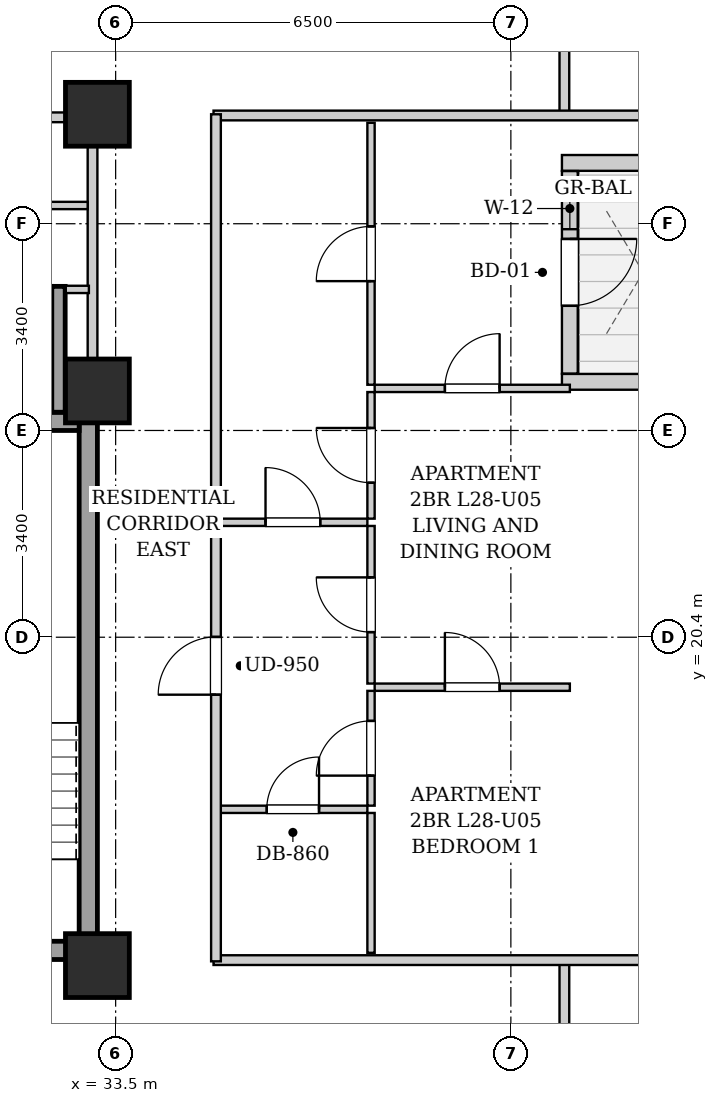
"""IFC4 building model, lengths in metres.
Left out: names, types, materials, properties, quantities, classifications, styles, units other than length and angle.
Written with IfcOpenShell. Run it as: python <this file> out.ifc"""

import sys

from ifc_helpers import new_model, si_unit, direction, frame, frame_2d, origin, origin_2d, place, context, subcontext, project, spatial, rectangle, extrude, element, fill, save


model = new_model("IFC4")
c1 = context("Model", 3, precision=1e-05, world=origin(), true_north=direction((0.0, 1.0)))
c2 = subcontext(c1, "Body", "Model", "MODEL_VIEW")
j1 = project(units=[si_unit("LENGTHUNIT", "METRE"), si_unit("PLANEANGLEUNIT", "RADIAN")], contexts=[c1])
p1 = place(None, origin())
s1 = spatial("IfcSite", under=j1, at=p1, CompositionType="ELEMENT")
p2 = place(p1, origin())
s2 = spatial("IfcBuilding", under=s1, at=p2, CompositionType="ELEMENT")
p3 = place(p2, frame((0.0, 0.0, 100.7)))
s3 = spatial("IfcBuildingStorey", under=s2, at=p3, CompositionType="ELEMENT", Elevation=100.7)
for number, where, z_axis, x_axis in (
    (1, (33.2, 15.0, 0.0), (0.0, 0.0, 1.0), (1.0, 0.0, 0.0)),
    (2, (33.2, 29.0, 0.0), (0.0, 0.0, 1.0), (1.0, 0.0, 0.0)),
    (3, (33.2, 24.45, 0.0), (0.0, 0.0, 1.0), (1.0, 0.0, 0.0)),
):
    element("IfcColumn", number, at=place(p3, frame(where, z_axis=z_axis, x_axis=x_axis)), inside=s3, PredefinedType="COLUMN", context=c2, shape_type="SweptSolid", body=[
        extrude(rectangle(XDim=1.05, YDim=1.05, at=origin_2d()), origin(), (0.0, 0.0, 1.0), 3.2),
    ])
p4 = place(p3, frame((43.24, 28.2, 0.0), z_axis=(0.0, 0.0, 1.0), x_axis=(-1.0, 0.0, 0.0)))
e4 = element("IfcWall", 4, at=p4, inside=s3, PredefinedType="SOLIDWALL", context=c2, shape_type="SweptSolid", body=[
    extrude(rectangle(XDim=2.4, YDim=0.26, at=frame_2d((1.2, 0.0))), origin(), (0.0, 0.0, 1.0), 2.94),
])
p5 = place(p3, frame((40.97, 28.066, 0.0), z_axis=(0.0, 0.0, 1.0), x_axis=(0.0, -1.0, 0.0)))
e5 = element("IfcWall", 5, at=p5, inside=s3, PredefinedType="SOLIDWALL", context=c2, shape_type="SweptSolid", body=[
    extrude(rectangle(XDim=3.332, YDim=0.26, at=frame_2d((1.666, 0.0))), origin(), (0.0, 0.0, 1.0), 2.94),
])
p6 = place(p5, frame((1.116, 0.0, 0.0)))
e6 = element("IfcOpeningElement", 6, at=p6, cuts=e5, PredefinedType="OPENING", context=c2, shape_type="SweptSolid", body=[
    extrude(rectangle(XDim=1.1, YDim=2.0, at=frame_2d((0.55, 1.0))), frame((0.0, 0.14, 0.0), z_axis=(0.0, -1.0, 0.0), x_axis=(1.0, 0.0, 0.0)), (0.0, 0.0, 1.0), 0.28),
])
p7 = place(p5, frame((0.276, 0.0, 0.55)))
e7 = element("IfcOpeningElement", 7, at=p7, cuts=e5, PredefinedType="OPENING", context=c2, shape_type="SweptSolid", body=[
    extrude(rectangle(XDim=0.68, YDim=1.2, at=frame_2d((0.34, 0.6))), frame((0.0, 0.14, 0.0), z_axis=(0.0, -1.0, 0.0), x_axis=(1.0, 0.0, 0.0)), (0.0, 0.0, 1.0), 0.28),
])
p8 = place(p3, frame((40.84, 24.6, 0.0), z_axis=(0.0, 0.0, 1.0), x_axis=(1.0, 0.0, 0.0)))
e8 = element("IfcWall", 8, at=p8, inside=s3, PredefinedType="SOLIDWALL", context=c2, shape_type="SweptSolid", body=[
    extrude(rectangle(XDim=2.4, YDim=0.26, at=frame_2d((1.2, 0.0))), origin(), (0.0, 0.0, 1.0), 2.94),
])
p9 = place(p3, frame((33.05, 15.1, 0.0), z_axis=(0.0, 0.0, 1.0), x_axis=(0.0, 1.0, 0.0)))
e9 = element("IfcWall", 9, at=p9, inside=s3, PredefinedType="SHEAR", context=c2, shape_type="SweptSolid", body=[
    extrude(rectangle(XDim=9.0, YDim=0.3, at=frame_2d((4.5, 0.0))), origin(), (0.0, 0.0, 1.0), 2.94),
])
p10 = place(p3, frame((30.05, 23.95, 0.0), z_axis=(0.0, 0.0, 1.0), x_axis=(1.0, 0.0, 0.0)))
e10 = element("IfcWall", 10, at=p10, inside=s3, PredefinedType="SHEAR", context=c2, shape_type="SweptSolid", body=[
    extrude(rectangle(XDim=2.85, YDim=0.3, at=frame_2d((1.425, 0.0))), origin(), (0.0, 0.0, 1.0), 2.94),
])
p11 = place(p3, frame((30.05, 15.25, 0.0), z_axis=(0.0, 0.0, 1.0), x_axis=(1.0, 0.0, 0.0)))
e11 = element("IfcWall", 11, at=p11, inside=s3, PredefinedType="SHEAR", context=c2, shape_type="SweptSolid", body=[
    extrude(rectangle(XDim=2.85, YDim=0.3, at=frame_2d((1.425, 0.0))), origin(), (0.0, 0.0, 1.0), 2.94),
])
p12 = place(p11, frame((0.86, 0.0, 0.0)))
e12 = element("IfcOpeningElement", 12, at=p12, cuts=e11, PredefinedType="OPENING", context=c2, shape_type="SweptSolid", body=[
    extrude(rectangle(XDim=1.1, YDim=2.05, at=frame_2d((0.55, 1.025))), frame((0.0, 0.16, 0.0), z_axis=(0.0, -1.0, 0.0), x_axis=(1.0, 0.0, 0.0)), (0.0, 0.0, 1.0), 0.32),
])
p13 = place(p3, frame((32.56, 24.1, 0.0), z_axis=(0.0, 0.0, 1.0), x_axis=(0.0, 1.0, 0.0)))
e13 = element("IfcWall", 13, at=p13, inside=s3, PredefinedType="SHEAR", context=c2, shape_type="SweptSolid", body=[
    extrude(rectangle(XDim=2.07, YDim=0.22, at=frame_2d((1.035, 0.0))), origin(), (0.0, 0.0, 1.0), 2.94),
])
p14 = place(p3, frame((33.12, 24.12, 0.0), z_axis=(0.0, 0.0, 1.0), x_axis=(0.0, 1.0, 0.0)))
e14 = element("IfcWall", 14, at=p14, inside=s3, PredefinedType="PARTITIONING", context=c2, shape_type="SweptSolid", body=[
    extrude(rectangle(XDim=4.76, YDim=0.16, at=frame_2d((2.38, 0.0))), origin(), (0.0, 0.0, 1.0), 2.94),
])
p15 = place(p3, frame((32.68, 26.12, 0.0), z_axis=(0.0, 0.0, 1.0), x_axis=(1.0, 0.0, 0.0)))
e15 = element("IfcWall", 15, at=p15, inside=s3, PredefinedType="PARTITIONING", context=c2, shape_type="SweptSolid", body=[
    extrude(rectangle(XDim=0.38, YDim=0.12, at=frame_2d((0.19, 0.0))), origin(), (0.0, 0.0, 1.0), 2.94),
])
p16 = place(p3, frame((30.16, 27.5, 0.0), z_axis=(0.0, 0.0, 1.0), x_axis=(1.0, 0.0, 0.0)))
e16 = element("IfcWall", 16, at=p16, inside=s3, PredefinedType="PARTITIONING", context=c2, shape_type="SweptSolid", body=[
    extrude(rectangle(XDim=2.88, YDim=0.12, at=frame_2d((1.44, 0.0))), origin(), (0.0, 0.0, 1.0), 2.94),
])
p17 = place(p16, frame((0.97, 0.0, 0.0)))
e17 = element("IfcOpeningElement", 17, at=p17, cuts=e16, PredefinedType="OPENING", context=c2, shape_type="SweptSolid", body=[
    extrude(rectangle(XDim=0.86, YDim=2.05, at=frame_2d((0.43, 1.025))), frame((0.0, 0.07, 0.0), z_axis=(0.0, -1.0, 0.0), x_axis=(1.0, 0.0, 0.0)), (0.0, 0.0, 1.0), 0.14),
])
p18 = place(p3, frame((30.08, 28.95, 0.0), z_axis=(0.0, 0.0, 1.0), x_axis=(1.0, 0.0, 0.0)))
e18 = element("IfcWall", 18, at=p18, inside=s3, PredefinedType="PARTITIONING", context=c2, shape_type="SweptSolid", body=[
    extrude(rectangle(XDim=2.96, YDim=0.16, at=frame_2d((1.48, 0.0))), origin(), (0.0, 0.0, 1.0), 2.94),
])
p19 = place(p18, frame((1.045, 0.0, 0.0)))
e19 = element("IfcOpeningElement", 19, at=p19, cuts=e18, PredefinedType="OPENING", context=c2, shape_type="SweptSolid", body=[
    extrude(rectangle(XDim=0.86, YDim=2.05, at=frame_2d((0.43, 1.025))), frame((0.0, 0.09, 0.0), z_axis=(0.0, -1.0, 0.0), x_axis=(1.0, 0.0, 0.0)), (0.0, 0.0, 1.0), 0.18),
])
for number, where, z_axis, x_axis in (
    (20, (40.88, 13.35, 0.0), (0.0, 0.0, 1.0), (0.0, 1.0, 0.0)),
    (21, (40.88, 28.98, 0.0), (0.0, 0.0, 1.0), (0.0, 1.0, 0.0)),
):
    element("IfcWall", number, at=place(p3, frame(where, z_axis=z_axis, x_axis=x_axis)), inside=s3, PredefinedType="PARTITIONING", context=c2, shape_type="SweptSolid", body=[
        extrude(rectangle(XDim=1.74, YDim=0.16, at=frame_2d((0.87, 0.0))), origin(), (0.0, 0.0, 1.0), 2.94),
    ])
for number, where, z_axis, x_axis in (
    (22, (35.11, 15.09, 0.0), (0.0, 0.0, 1.0), (1.0, 0.0, 0.0)),
    (23, (35.11, 28.98, 0.0), (0.0, 0.0, 1.0), (1.0, 0.0, 0.0)),
):
    element("IfcWall", number, at=place(p3, frame(where, z_axis=z_axis, x_axis=x_axis)), inside=s3, PredefinedType="PARTITIONING", context=c2, shape_type="SweptSolid", body=[
        extrude(rectangle(XDim=8.01, YDim=0.16, at=frame_2d((4.005, 0.0))), origin(), (0.0, 0.0, 1.0), 2.313),
    ])
p20 = place(p3, frame((35.19, 22.29, 0.0), z_axis=(0.0, 0.0, 1.0), x_axis=(1.0, 0.0, 0.0)))
e24 = element("IfcWall", 24, at=p20, inside=s3, PredefinedType="PARTITIONING", context=c2, shape_type="SweptSolid", body=[
    extrude(rectangle(XDim=2.45, YDim=0.12, at=frame_2d((1.225, 0.0))), origin(), (0.0, 0.0, 1.0), 2.94),
])
p21 = place(p20, frame((0.775, 0.0, 0.0)))
e25 = element("IfcOpeningElement", 25, at=p21, cuts=e24, PredefinedType="OPENING", context=c2, shape_type="SweptSolid", body=[
    extrude(rectangle(XDim=0.9, YDim=2.05, at=frame_2d((0.45, 1.025))), frame((0.0, 0.07, 0.0), z_axis=(0.0, -1.0, 0.0), x_axis=(1.0, 0.0, 0.0)), (0.0, 0.0, 1.0), 0.14),
])
p22 = place(p3, frame((37.7, 22.35, 0.0), z_axis=(0.0, 0.0, 1.0), x_axis=(0.0, 1.0, 0.0)))
e26 = element("IfcWall", 26, at=p22, inside=s3, PredefinedType="PARTITIONING", context=c2, shape_type="SweptSolid", body=[
    extrude(rectangle(XDim=2.082, YDim=0.12, at=frame_2d((1.041, 0.0))), origin(), (0.0, 0.0, 1.0), 2.94),
])
p23 = place(p22, frame((0.591, 0.0, 0.0)))
e27 = element("IfcOpeningElement", 27, at=p23, cuts=e26, PredefinedType="OPENING", context=c2, shape_type="SweptSolid", body=[
    extrude(rectangle(XDim=0.9, YDim=2.05, at=frame_2d((0.45, 1.025))), frame((0.0, 0.07, 0.0), z_axis=(0.0, -1.0, 0.0), x_axis=(1.0, 0.0, 0.0)), (0.0, 0.0, 1.0), 0.14),
])
p24 = place(p3, frame((37.7, 24.552, 0.0), z_axis=(0.0, 0.0, 1.0), x_axis=(0.0, 1.0, 0.0)))
e28 = element("IfcWall", 28, at=p24, inside=s3, PredefinedType="PARTITIONING", context=c2, shape_type="SweptSolid", body=[
    extrude(rectangle(XDim=4.308, YDim=0.12, at=frame_2d((2.154, 0.0))), origin(), (0.0, 0.0, 1.0), 2.94),
])
p25 = place(p24, frame((1.704, 0.0, 0.0)))
e29 = element("IfcOpeningElement", 29, at=p25, cuts=e28, PredefinedType="OPENING", context=c2, shape_type="SweptSolid", body=[
    extrude(rectangle(XDim=0.9, YDim=2.05, at=frame_2d((0.45, 1.025))), frame((0.0, 0.07, 0.0), z_axis=(0.0, -1.0, 0.0), x_axis=(1.0, 0.0, 0.0)), (0.0, 0.0, 1.0), 0.14),
])
p26 = place(p3, frame((35.19, 17.57, 0.0), z_axis=(0.0, 0.0, 1.0), x_axis=(1.0, 0.0, 0.0)))
e30 = element("IfcWall", 30, at=p26, inside=s3, PredefinedType="PARTITIONING", context=c2, shape_type="SweptSolid", body=[
    extrude(rectangle(XDim=2.45, YDim=0.12, at=frame_2d((1.225, 0.0))), origin(), (0.0, 0.0, 1.0), 2.94),
])
p27 = place(p26, frame((0.795, 0.0, 0.0)))
e31 = element("IfcOpeningElement", 31, at=p27, cuts=e30, PredefinedType="OPENING", context=c2, shape_type="SweptSolid", body=[
    extrude(rectangle(XDim=0.86, YDim=2.05, at=frame_2d((0.43, 1.025))), frame((0.0, 0.07, 0.0), z_axis=(0.0, -1.0, 0.0), x_axis=(1.0, 0.0, 0.0)), (0.0, 0.0, 1.0), 0.14),
])
p28 = place(p3, frame((37.7, 15.21, 0.0), z_axis=(0.0, 0.0, 1.0), x_axis=(0.0, 1.0, 0.0)))
e32 = element("IfcWall", 32, at=p28, inside=s3, PredefinedType="PARTITIONING", context=c2, shape_type="SweptSolid", body=[
    extrude(rectangle(XDim=2.3, YDim=0.12, at=frame_2d((1.15, 0.0))), origin(), (0.0, 0.0, 1.0), 2.94),
])
p29 = place(p3, frame((37.7, 17.63, 0.0), z_axis=(0.0, 0.0, 1.0), x_axis=(0.0, 1.0, 0.0)))
e33 = element("IfcWall", 33, at=p29, inside=s3, PredefinedType="PARTITIONING", context=c2, shape_type="SweptSolid", body=[
    extrude(rectangle(XDim=1.888, YDim=0.12, at=frame_2d((0.944, 0.0))), origin(), (0.0, 0.0, 1.0), 2.94),
])
p30 = place(p29, frame((0.494, 0.0, 0.0)))
e34 = element("IfcOpeningElement", 34, at=p30, cuts=e33, PredefinedType="OPENING", context=c2, shape_type="SweptSolid", body=[
    extrude(rectangle(XDim=0.9, YDim=2.05, at=frame_2d((0.45, 1.025))), frame((0.0, 0.07, 0.0), z_axis=(0.0, -1.0, 0.0), x_axis=(1.0, 0.0, 0.0)), (0.0, 0.0, 1.0), 0.14),
])
p31 = place(p3, frame((37.7, 19.638, 0.0), z_axis=(0.0, 0.0, 1.0), x_axis=(0.0, 1.0, 0.0)))
e35 = element("IfcWall", 35, at=p31, inside=s3, PredefinedType="PARTITIONING", context=c2, shape_type="SweptSolid", body=[
    extrude(rectangle(XDim=2.592, YDim=0.12, at=frame_2d((1.296, 0.0))), origin(), (0.0, 0.0, 1.0), 2.94),
])
p32 = place(p31, frame((0.846, 0.0, 0.0)))
e36 = element("IfcOpeningElement", 36, at=p32, cuts=e35, PredefinedType="OPENING", context=c2, shape_type="SweptSolid", body=[
    extrude(rectangle(XDim=0.9, YDim=2.05, at=frame_2d((0.45, 1.025))), frame((0.0, 0.07, 0.0), z_axis=(0.0, -1.0, 0.0), x_axis=(1.0, 0.0, 0.0)), (0.0, 0.0, 1.0), 0.14),
])
p33 = place(p3, frame((37.76, 19.578, 0.0), z_axis=(0.0, 0.0, 1.0), x_axis=(1.0, 0.0, 0.0)))
e37 = element("IfcWall", 37, at=p33, inside=s3, PredefinedType="PARTITIONING", context=c2, shape_type="SweptSolid", body=[
    extrude(rectangle(XDim=3.21, YDim=0.12, at=frame_2d((1.605, 0.0))), origin(), (0.0, 0.0, 1.0), 2.94),
])
p34 = place(p33, frame((1.155, 0.0, 0.0)))
e38 = element("IfcOpeningElement", 38, at=p34, cuts=e37, PredefinedType="OPENING", context=c2, shape_type="SweptSolid", body=[
    extrude(rectangle(XDim=0.9, YDim=2.05, at=frame_2d((0.45, 1.025))), frame((0.0, 0.07, 0.0), z_axis=(0.0, -1.0, 0.0), x_axis=(1.0, 0.0, 0.0)), (0.0, 0.0, 1.0), 0.14),
])
p35 = place(p3, frame((37.76, 24.492, 0.0), z_axis=(0.0, 0.0, 1.0), x_axis=(1.0, 0.0, 0.0)))
e39 = element("IfcWall", 39, at=p35, inside=s3, PredefinedType="PARTITIONING", context=c2, shape_type="SweptSolid", body=[
    extrude(rectangle(XDim=3.21, YDim=0.12, at=frame_2d((1.605, 0.0))), origin(), (0.0, 0.0, 1.0), 2.518),
])
p36 = place(p35, frame((1.155, 0.0, 0.0)))
e40 = element("IfcOpeningElement", 40, at=p36, cuts=e39, PredefinedType="OPENING", context=c2, shape_type="SweptSolid", body=[
    extrude(rectangle(XDim=0.9, YDim=2.05, at=frame_2d((0.45, 1.025))), frame((0.0, 0.07, 0.0), z_axis=(0.0, -1.0, 0.0), x_axis=(1.0, 0.0, 0.0)), (0.0, 0.0, 1.0), 0.14),
])
p37 = place(p3, frame((35.15, 15.07, 0.0), z_axis=(0.0, 0.0, 1.0), x_axis=(0.0, 1.0, 0.0)))
e41 = element("IfcWall", 41, at=p37, inside=s3, PredefinedType="PARTITIONING", context=c2, shape_type="SweptSolid", body=[
    extrude(rectangle(XDim=13.93, YDim=0.16, at=frame_2d((6.965, 0.0))), origin(), (0.0, 0.0, 1.0), 2.94),
])
p38 = place(p37, frame((4.385, 0.0, 0.0)))
e42 = element("IfcOpeningElement", 42, at=p38, cuts=e41, PredefinedType="OPENING", context=c2, shape_type="SweptSolid", body=[
    extrude(rectangle(XDim=0.95, YDim=2.1, at=frame_2d((0.475, 1.05))), frame((0.0, 0.09, 0.0), z_axis=(0.0, -1.0, 0.0), x_axis=(1.0, 0.0, 0.0)), (0.0, 0.0, 1.0), 0.18),
])
p39 = place(p21, origin())
e43 = element("IfcDoor", 43, at=p39, inside=s3, OperationType="SINGLE_SWING_LEFT", PredefinedType="DOOR", context=c2, shape_type="SweptSolid", body=[
    extrude(rectangle(XDim=0.9, YDim=2.05, at=frame_2d((0.45, 1.025))), frame((0.0, 0.025, 0.0), z_axis=(0.0, -1.0, 0.0), x_axis=(1.0, 0.0, 0.0)), (0.0, 0.0, 1.0), 0.05),
])
fill(e25, e43)
p40 = place(p23, origin())
e44 = element("IfcDoor", 44, at=p40, inside=s3, OperationType="SINGLE_SWING_RIGHT", PredefinedType="DOOR", context=c2, shape_type="SweptSolid", body=[
    extrude(rectangle(XDim=0.9, YDim=2.05, at=frame_2d((0.45, 1.025))), frame((0.0, 0.025, 0.0), z_axis=(0.0, -1.0, 0.0), x_axis=(1.0, 0.0, 0.0)), (0.0, 0.0, 1.0), 0.05),
])
fill(e27, e44)
p41 = place(p25, origin())
e45 = element("IfcDoor", 45, at=p41, inside=s3, OperationType="SINGLE_SWING_LEFT", PredefinedType="DOOR", context=c2, shape_type="SweptSolid", body=[
    extrude(rectangle(XDim=0.9, YDim=2.05, at=frame_2d((0.45, 1.025))), frame((0.0, 0.025, 0.0), z_axis=(0.0, -1.0, 0.0), x_axis=(1.0, 0.0, 0.0)), (0.0, 0.0, 1.0), 0.05),
])
fill(e29, e45)
p42 = place(p27, origin())
e46 = element("IfcDoor", 46, at=p42, inside=s3, OperationType="SINGLE_SWING_RIGHT", PredefinedType="DOOR", context=c2, shape_type="SweptSolid", body=[
    extrude(rectangle(XDim=0.86, YDim=2.05, at=frame_2d((0.43, 1.025))), frame((0.0, 0.025, 0.0), z_axis=(0.0, -1.0, 0.0), x_axis=(1.0, 0.0, 0.0)), (0.0, 0.0, 1.0), 0.05),
])
fill(e31, e46)
p43 = place(p30, origin())
e47 = element("IfcDoor", 47, at=p43, inside=s3, OperationType="SINGLE_SWING_LEFT", PredefinedType="DOOR", context=c2, shape_type="SweptSolid", body=[
    extrude(rectangle(XDim=0.9, YDim=2.05, at=frame_2d((0.45, 1.025))), frame((0.0, 0.025, 0.0), z_axis=(0.0, -1.0, 0.0), x_axis=(1.0, 0.0, 0.0)), (0.0, 0.0, 1.0), 0.05),
])
fill(e34, e47)
p44 = place(p32, origin())
e48 = element("IfcDoor", 48, at=p44, inside=s3, OperationType="SINGLE_SWING_RIGHT", PredefinedType="DOOR", context=c2, shape_type="SweptSolid", body=[
    extrude(rectangle(XDim=0.9, YDim=2.05, at=frame_2d((0.45, 1.025))), frame((0.0, 0.025, 0.0), z_axis=(0.0, -1.0, 0.0), x_axis=(1.0, 0.0, 0.0)), (0.0, 0.0, 1.0), 0.05),
])
fill(e36, e48)
p45 = place(p34, origin())
e49 = element("IfcDoor", 49, at=p45, inside=s3, OperationType="SINGLE_SWING_LEFT", PredefinedType="DOOR", context=c2, shape_type="SweptSolid", body=[
    extrude(rectangle(XDim=0.9, YDim=2.05, at=frame_2d((0.45, 1.025))), frame((0.0, 0.025, 0.0), z_axis=(0.0, -1.0, 0.0), x_axis=(1.0, 0.0, 0.0)), (0.0, 0.0, 1.0), 0.05),
])
fill(e38, e49)
p46 = place(p36, origin())
e50 = element("IfcDoor", 50, at=p46, inside=s3, OperationType="SINGLE_SWING_RIGHT", PredefinedType="DOOR", context=c2, shape_type="SweptSolid", body=[
    extrude(rectangle(XDim=0.9, YDim=2.05, at=frame_2d((0.45, 1.025))), frame((0.0, 0.025, 0.0), z_axis=(0.0, -1.0, 0.0), x_axis=(1.0, 0.0, 0.0)), (0.0, 0.0, 1.0), 0.05),
])
fill(e40, e50)
p47 = place(p38, origin())
e51 = element("IfcDoor", 51, at=p47, inside=s3, OperationType="SINGLE_SWING_LEFT", PredefinedType="DOOR", context=c2, shape_type="SweptSolid", body=[
    extrude(rectangle(XDim=0.95, YDim=2.1, at=frame_2d((0.475, 1.05))), frame((0.0, 0.025, 0.0), z_axis=(0.0, -1.0, 0.0), x_axis=(1.0, 0.0, 0.0)), (0.0, 0.0, 1.0), 0.05),
])
fill(e42, e51)
p48 = place(p6, origin())
e52 = element("IfcDoor", 52, at=p48, inside=s3, OperationType="SINGLE_SWING_LEFT", PredefinedType="DOOR", context=c2, shape_type="SweptSolid", body=[
    extrude(rectangle(XDim=1.1, YDim=2.0, at=frame_2d((0.55, 1.0))), frame((0.0, 0.025, 0.0), z_axis=(0.0, -1.0, 0.0), x_axis=(1.0, 0.0, 0.0)), (0.0, 0.0, 1.0), 0.05),
])
fill(e6, e52)
p49 = place(p7, origin())
e53 = element("IfcWindow", 53, at=p49, inside=s3, PartitioningType="SINGLE_PANEL", PredefinedType="WINDOW", context=c2, shape_type="SweptSolid", body=[
    extrude(rectangle(XDim=0.68, YDim=1.2, at=frame_2d((0.34, 0.6))), frame((0.0, 0.03, 0.0), z_axis=(0.0, -1.0, 0.0), x_axis=(1.0, 0.0, 0.0)), (0.0, 0.0, 1.0), 0.06),
])
fill(e7, e53)
save(model, sys.argv[1])
